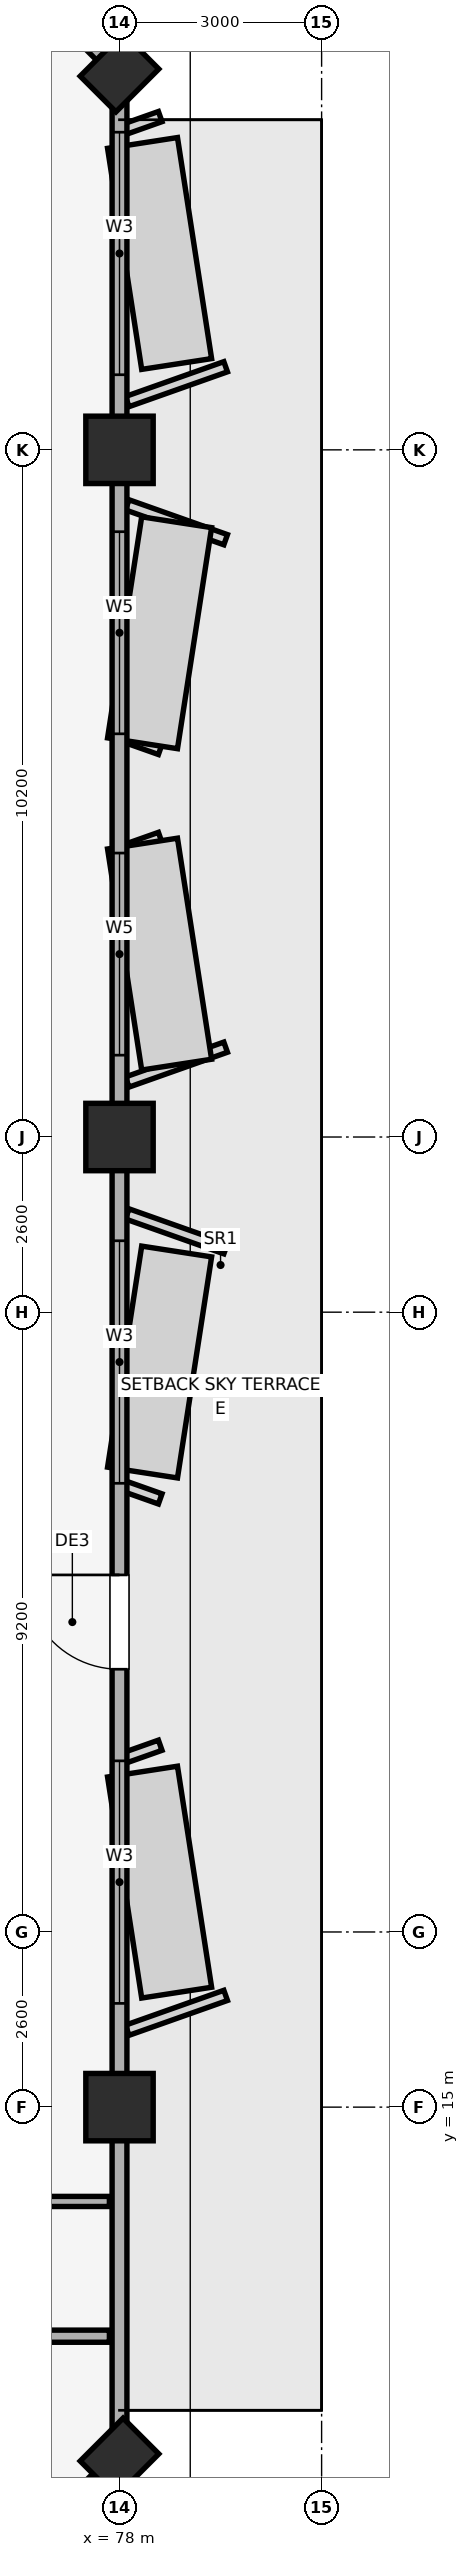
"""IFC4 building model, lengths in metres.
Left out: names, types, materials, properties, quantities, classifications, styles, units other than length and angle.
Written with IfcOpenShell. Run it as: python <this file> out.ifc"""

import sys

from ifc_helpers import new_model, si_unit, direction, frame, frame_2d, origin, origin_2d, place, context, subcontext, project, spatial, rectangle, extrude, element, fill, save


model = new_model("IFC4")
c1 = context("Model", 3, precision=1e-05, world=origin(), true_north=direction((0.0, 1.0)))
c2 = subcontext(c1, "Body", "Model", "MODEL_VIEW")
j1 = project(units=[si_unit("LENGTHUNIT", "METRE"), si_unit("PLANEANGLEUNIT", "RADIAN")], contexts=[c1])
p1 = place(None, origin())
s1 = spatial("IfcSite", under=j1, at=p1, CompositionType="ELEMENT")
p2 = place(p1, origin())
s2 = spatial("IfcBuilding", under=s1, at=p2, CompositionType="ELEMENT")
p3 = place(p2, frame((0.0, 0.0, 229.15)))
s3 = spatial("IfcBuildingStorey", under=s2, at=p3, CompositionType="ELEMENT", Elevation=229.15)
for number, where, z_axis, x_axis in (
    (1, (78.0, 15.0, 0.0), (0.0, 0.0, 1.0), (1.0, 0.0, 0.0)),
    (2, (78.0, 29.4, 0.0), (0.0, 0.0, 1.0), (1.0, 0.0, 0.0)),
    (3, (78.0, 39.6, 0.0), (0.0, 0.0, 1.0), (1.0, 0.0, 0.0)),
):
    element("IfcColumn", number, at=place(p3, frame(where, z_axis=z_axis, x_axis=x_axis)), inside=s3, PredefinedType="COLUMN", context=c2, shape_type="SweptSolid", body=[
        extrude(rectangle(XDim=1.0, YDim=1.0, at=origin_2d()), origin(), (0.0, 0.0, 1.0), 3.71),
    ])
for number, where, z_axis, x_axis in (
    (4, (78.0, 9.8, 0.0), (0.0, 0.0, 1.0), (0.707, 0.707, 0.0)),
    (5, (78.0, 45.2, 0.0), (0.0, 0.0, 1.0), (0.707, 0.707, 0.0)),
):
    element("IfcColumn", number, at=place(p3, frame(where, z_axis=z_axis, x_axis=x_axis)), inside=s3, PredefinedType="PILASTER", context=c2, shape_type="SweptSolid", body=[
        extrude(rectangle(XDim=0.9, YDim=0.75, at=origin_2d()), origin(), (0.0, 0.0, 1.0), 3.71),
    ])
p4 = place(p3, frame((74.2, 6.0, 0.0), z_axis=(0.0, 0.0, 1.0), x_axis=(0.707106781187, 0.707106781187, 0.0)))
e6 = element("IfcWall", 6, at=p4, inside=s3, PredefinedType="SOLIDWALL", context=c2, shape_type="SweptSolid", body=[
    extrude(rectangle(XDim=5.374, YDim=0.22, at=frame_2d((2.687, 0.0))), origin(), (0.0, 0.0, 1.0), 2.91),
])
p5 = place(p4, frame((1.637, 0.0, 0.85)))
e7 = element("IfcOpeningElement", 7, at=p5, cuts=e6, PredefinedType="OPENING", context=c2, shape_type="SweptSolid", body=[
    extrude(rectangle(XDim=2.1, YDim=1.6, at=frame_2d((1.05, 0.8))), frame((0.0, 0.12, 0.0), z_axis=(0.0, -1.0, 0.0), x_axis=(1.0, 0.0, 0.0)), (0.0, 0.0, 1.0), 0.24),
])
p6 = place(p3, frame((78.0, 9.8, 0.0), z_axis=(0.0, 0.0, 1.0), x_axis=(0.0, 1.0, 0.0)))
e8 = element("IfcWall", 8, at=p6, inside=s3, PredefinedType="SOLIDWALL", context=c2, shape_type="SweptSolid", body=[
    extrude(rectangle(XDim=35.4, YDim=0.22, at=frame_2d((17.7, 0.0))), origin(), (0.0, 0.0, 1.0), 2.91),
])
p7 = place(p6, frame((11.7, 0.0, 0.0)))
e9 = element("IfcOpeningElement", 9, at=p7, cuts=e8, PredefinedType="OPENING", context=c2, shape_type="SweptSolid", body=[
    extrude(rectangle(XDim=1.4, YDim=2.2, at=frame_2d((0.7, 1.1))), frame((0.0, 0.12, 0.0), z_axis=(0.0, -1.0, 0.0), x_axis=(1.0, 0.0, 0.0)), (0.0, 0.0, 1.0), 0.24),
])
p8 = place(p6, frame((6.74, 0.0, 0.85)))
e10 = element("IfcOpeningElement", 10, at=p8, cuts=e8, PredefinedType="OPENING", context=c2, shape_type="SweptSolid", body=[
    extrude(rectangle(XDim=3.6, YDim=1.65, at=frame_2d((1.8, 0.825))), frame((0.0, 0.12, 0.0), z_axis=(0.0, -1.0, 0.0), x_axis=(1.0, 0.0, 0.0)), (0.0, 0.0, 1.0), 0.24),
])
p9 = place(p6, frame((14.46, 0.0, 0.85)))
e11 = element("IfcOpeningElement", 11, at=p9, cuts=e8, PredefinedType="OPENING", context=c2, shape_type="SweptSolid", body=[
    extrude(rectangle(XDim=3.6, YDim=1.65, at=frame_2d((1.8, 0.825))), frame((0.0, 0.12, 0.0), z_axis=(0.0, -1.0, 0.0), x_axis=(1.0, 0.0, 0.0)), (0.0, 0.0, 1.0), 0.24),
])
p10 = place(p6, frame((20.815, 0.0, 0.85)))
e12 = element("IfcOpeningElement", 12, at=p10, cuts=e8, PredefinedType="OPENING", context=c2, shape_type="SweptSolid", body=[
    extrude(rectangle(XDim=3.0, YDim=1.5, at=frame_2d((1.5, 0.75))), frame((0.0, 0.12, 0.0), z_axis=(0.0, -1.0, 0.0), x_axis=(1.0, 0.0, 0.0)), (0.0, 0.0, 1.0), 0.24),
])
p11 = place(p6, frame((25.585, 0.0, 0.85)))
e13 = element("IfcOpeningElement", 13, at=p11, cuts=e8, PredefinedType="OPENING", context=c2, shape_type="SweptSolid", body=[
    extrude(rectangle(XDim=3.0, YDim=1.5, at=frame_2d((1.5, 0.75))), frame((0.0, 0.12, 0.0), z_axis=(0.0, -1.0, 0.0), x_axis=(1.0, 0.0, 0.0)), (0.0, 0.0, 1.0), 0.24),
])
p12 = place(p6, frame((30.915, 0.0, 0.85)))
e14 = element("IfcOpeningElement", 14, at=p12, cuts=e8, PredefinedType="OPENING", context=c2, shape_type="SweptSolid", body=[
    extrude(rectangle(XDim=3.6, YDim=1.65, at=frame_2d((1.8, 0.825))), frame((0.0, 0.12, 0.0), z_axis=(0.0, -1.0, 0.0), x_axis=(1.0, 0.0, 0.0)), (0.0, 0.0, 1.0), 0.24),
])
p13 = place(p3, frame((78.0, 45.2, 0.0), z_axis=(0.0, 0.0, 1.0), x_axis=(-0.707106781187, 0.707106781187, 0.0)))
e15 = element("IfcWall", 15, at=p13, inside=s3, PredefinedType="SOLIDWALL", context=c2, shape_type="SweptSolid", body=[
    extrude(rectangle(XDim=5.374, YDim=0.22, at=frame_2d((2.687, 0.0))), origin(), (0.0, 0.0, 1.0), 2.91),
])
p14 = place(p13, frame((1.637, 0.0, 0.85)))
e16 = element("IfcOpeningElement", 16, at=p14, cuts=e15, PredefinedType="OPENING", context=c2, shape_type="SweptSolid", body=[
    extrude(rectangle(XDim=2.1, YDim=1.6, at=frame_2d((1.05, 0.8))), frame((0.0, 0.12, 0.0), z_axis=(0.0, -1.0, 0.0), x_axis=(1.0, 0.0, 0.0)), (0.0, 0.0, 1.0), 0.24),
])
p15 = place(p3, frame((68.554, 11.6, 0.0), z_axis=(0.0, 0.0, 1.0), x_axis=(1.0, 0.0, 0.0)))
e17 = element("IfcWall", 17, at=p15, inside=s3, PredefinedType="PARTITIONING", context=c2, shape_type="SweptSolid", body=[
    extrude(rectangle(XDim=9.296, YDim=0.18, at=frame_2d((4.648, 0.0))), origin(), (0.0, 0.0, 1.0), 3.71),
])
p16 = place(p15, frame((3.746, 0.0, 0.0)))
e18 = element("IfcOpeningElement", 18, at=p16, cuts=e17, PredefinedType="OPENING", context=c2, shape_type="SweptSolid", body=[
    extrude(rectangle(XDim=1.0, YDim=2.15, at=frame_2d((0.5, 1.075))), frame((0.0, 0.1, 0.0), z_axis=(0.0, -1.0, 0.0), x_axis=(1.0, 0.0, 0.0)), (0.0, 0.0, 1.0), 0.2),
])
p17 = place(p3, frame((68.08, 13.6, 0.0), z_axis=(0.0, 0.0, 1.0), x_axis=(1.0, 0.0, 0.0)))
e19 = element("IfcWall", 19, at=p17, inside=s3, PredefinedType="PARTITIONING", context=c2, shape_type="SweptSolid", body=[
    extrude(rectangle(XDim=9.77, YDim=0.15, at=frame_2d((4.885, 0.0))), origin(), (0.0, 0.0, 1.0), 3.71),
])
p18 = place(p17, frame((2.14, 0.0, 0.0)))
e20 = element("IfcOpeningElement", 20, at=p18, cuts=e19, PredefinedType="OPENING", context=c2, shape_type="SweptSolid", body=[
    extrude(rectangle(XDim=1.5, YDim=2.25, at=frame_2d((0.75, 1.125))), frame((0.0, 0.085, 0.0), z_axis=(0.0, -1.0, 0.0), x_axis=(1.0, 0.0, 0.0)), (0.0, 0.0, 1.0), 0.17),
])
p19 = place(p7, origin())
e21 = element("IfcDoor", 21, at=p19, inside=s3, OperationType="SINGLE_SWING_RIGHT", PredefinedType="DOOR", context=c2, shape_type="SweptSolid", body=[
    extrude(rectangle(XDim=1.4, YDim=2.2, at=frame_2d((0.7, 1.1))), frame((0.0, 0.025, 0.0), z_axis=(0.0, -1.0, 0.0), x_axis=(1.0, 0.0, 0.0)), (0.0, 0.0, 1.0), 0.05),
])
fill(e9, e21)
p20 = place(p8, origin())
e22 = element("IfcWindow", 22, at=p20, inside=s3, PartitioningType="SINGLE_PANEL", PredefinedType="WINDOW", context=c2, shape_type="SweptSolid", body=[
    extrude(rectangle(XDim=3.6, YDim=1.65, at=frame_2d((1.8, 0.825))), frame((0.0, 0.03, 0.0), z_axis=(0.0, -1.0, 0.0), x_axis=(1.0, 0.0, 0.0)), (0.0, 0.0, 1.0), 0.06),
])
fill(e10, e22)
p21 = place(p9, origin())
e23 = element("IfcWindow", 23, at=p21, inside=s3, PartitioningType="SINGLE_PANEL", PredefinedType="WINDOW", context=c2, shape_type="SweptSolid", body=[
    extrude(rectangle(XDim=3.6, YDim=1.65, at=frame_2d((1.8, 0.825))), frame((0.0, 0.03, 0.0), z_axis=(0.0, -1.0, 0.0), x_axis=(1.0, 0.0, 0.0)), (0.0, 0.0, 1.0), 0.06),
])
fill(e11, e23)
p22 = place(p10, origin())
e24 = element("IfcWindow", 24, at=p22, inside=s3, PartitioningType="SINGLE_PANEL", PredefinedType="WINDOW", context=c2, shape_type="SweptSolid", body=[
    extrude(rectangle(XDim=3.0, YDim=1.5, at=frame_2d((1.5, 0.75))), frame((0.0, 0.03, 0.0), z_axis=(0.0, -1.0, 0.0), x_axis=(1.0, 0.0, 0.0)), (0.0, 0.0, 1.0), 0.06),
])
fill(e12, e24)
p23 = place(p11, origin())
e25 = element("IfcWindow", 25, at=p23, inside=s3, PartitioningType="SINGLE_PANEL", PredefinedType="WINDOW", context=c2, shape_type="SweptSolid", body=[
    extrude(rectangle(XDim=3.0, YDim=1.5, at=frame_2d((1.5, 0.75))), frame((0.0, 0.03, 0.0), z_axis=(0.0, -1.0, 0.0), x_axis=(1.0, 0.0, 0.0)), (0.0, 0.0, 1.0), 0.06),
])
fill(e13, e25)
p24 = place(p12, origin())
e26 = element("IfcWindow", 26, at=p24, inside=s3, PartitioningType="SINGLE_PANEL", PredefinedType="WINDOW", context=c2, shape_type="SweptSolid", body=[
    extrude(rectangle(XDim=3.6, YDim=1.65, at=frame_2d((1.8, 0.825))), frame((0.0, 0.03, 0.0), z_axis=(0.0, -1.0, 0.0), x_axis=(1.0, 0.0, 0.0)), (0.0, 0.0, 1.0), 0.06),
])
fill(e14, e26)
save(model, sys.argv[1])
